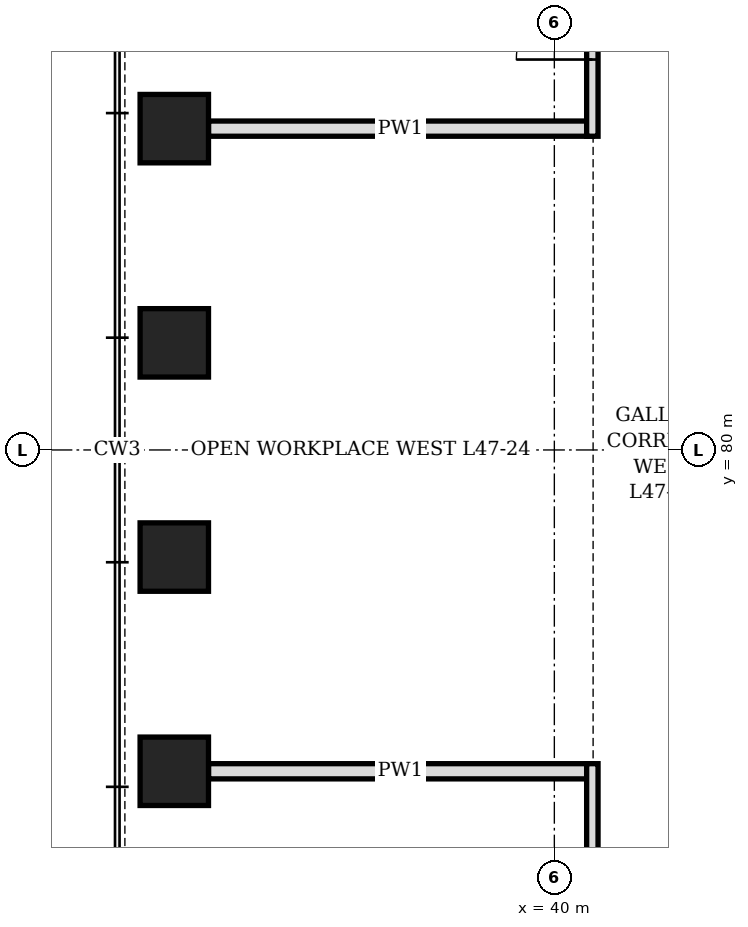
"""IFC4 building model, lengths in metres.
Left out: names, types, materials, properties, quantities, classifications, styles, units other than length and angle.
Written with IfcOpenShell. Run it as: python <this file> out.ifc"""

import sys

from ifc_helpers import new_model, si_unit, direction, frame, frame_2d, origin, origin_2d, place, context, subcontext, project, spatial, rectangle, hollow_rectangle, extrude, element, fill, save


model = new_model("IFC4")
c1 = context("Model", 3, precision=1e-05, world=origin(), true_north=direction((0.0, 1.0)))
c2 = subcontext(c1, "Body", "Model", "MODEL_VIEW")
j1 = project(units=[si_unit("LENGTHUNIT", "METRE"), si_unit("PLANEANGLEUNIT", "RADIAN")], contexts=[c1])
p1 = place(None, origin())
s1 = spatial("IfcSite", under=j1, at=p1, CompositionType="ELEMENT")
p2 = place(p1, origin())
s2 = spatial("IfcBuilding", under=s1, at=p2, CompositionType="ELEMENT")
p3 = place(p2, frame((0.0, 0.0, 210.7)))
s3 = spatial("IfcBuildingStorey", under=s2, at=p3, CompositionType="ELEMENT", Elevation=210.7)
for number, where, z_axis, x_axis in (
    (1, (35.0, 84.227, 0.0), (0.0, 0.0, 1.0), (0.0, 1.0, 0.0)),
    (2, (35.0, 81.409, 0.0), (0.0, 0.0, 1.0), (0.0, 1.0, 0.0)),
    (3, (35.0, 78.591, 0.0), (0.0, 0.0, 1.0), (0.0, 1.0, 0.0)),
    (4, (35.0, 75.773, 0.0), (0.0, 0.0, 1.0), (0.0, 1.0, 0.0)),
):
    element("IfcColumn", number, at=place(p3, frame(where, z_axis=z_axis, x_axis=x_axis)), inside=s3, PredefinedType="COLUMN", context=c2, shape_type="SweptSolid", body=[
        extrude(hollow_rectangle(XDim=0.9, YDim=0.9, WallThickness=0.12, at=origin_2d()), origin(), (0.0, 0.0, 1.0), 4.2),
    ])
for number, where, z_axis, x_axis in (
    (5, (35.45, 75.773, 0.0), (0.0, 0.0, 1.0), (1.0, 0.0, 0.0)),
    (6, (35.45, 84.227, 0.0), (0.0, 0.0, 1.0), (1.0, 0.0, 0.0)),
):
    element("IfcWall", number, at=place(p3, frame(where, z_axis=z_axis, x_axis=x_axis)), inside=s3, PredefinedType="PARTITIONING", context=c2, shape_type="SweptSolid", body=[
        extrude(rectangle(XDim=5.05, YDim=0.2, at=frame_2d((2.525, 0.0))), origin(), (0.0, 0.0, 1.0), 3.428),
    ])
p4 = place(p3, frame((40.5, 64.95, 0.0), z_axis=(0.0, 0.0, 1.0), x_axis=(0.0, 1.0, 0.0)))
e7 = element("IfcWall", 7, at=p4, inside=s3, PredefinedType="PARTITIONING", context=c2, shape_type="SweptSolid", body=[
    extrude(rectangle(XDim=10.923, YDim=0.15, at=frame_2d((5.461, 0.0))), origin(), (0.0, 0.0, 1.0), 4.04),
])
p5 = place(p4, frame((3.277, 0.0, 0.0)))
e8 = element("IfcOpeningElement", 8, at=p5, cuts=e7, PredefinedType="OPENING", context=c2, shape_type="SweptSolid", body=[
    extrude(rectangle(XDim=1.0, YDim=2.4, at=frame_2d((0.5, 1.2))), frame((0.0, 0.085, 0.0), z_axis=(0.0, -1.0, 0.0), x_axis=(1.0, 0.0, 0.0)), (0.0, 0.0, 1.0), 0.17),
])
p6 = place(p3, frame((40.5, 84.127, 0.0), z_axis=(0.0, 0.0, 1.0), x_axis=(0.0, 1.0, 0.0)))
e9 = element("IfcWall", 9, at=p6, inside=s3, PredefinedType="PARTITIONING", context=c2, shape_type="SweptSolid", body=[
    extrude(rectangle(XDim=5.736, YDim=0.15, at=frame_2d((2.868, 0.0))), origin(), (0.0, 0.0, 1.0), 4.04),
])
p7 = place(p6, frame((1.009, 0.0, 0.0)))
e10 = element("IfcOpeningElement", 10, at=p7, cuts=e9, PredefinedType="OPENING", context=c2, shape_type="SweptSolid", body=[
    extrude(rectangle(XDim=1.0, YDim=2.4, at=frame_2d((0.5, 1.2))), frame((0.0, 0.085, 0.0), z_axis=(0.0, -1.0, 0.0), x_axis=(1.0, 0.0, 0.0)), (0.0, 0.0, 1.0), 0.17),
])
p8 = place(p7, origin())
e11 = element("IfcDoor", 11, at=p8, inside=s3, OperationType="SINGLE_SWING_RIGHT", PredefinedType="DOOR", context=c2, shape_type="SweptSolid", body=[
    extrude(rectangle(XDim=1.0, YDim=2.4, at=frame_2d((0.5, 1.2))), frame((0.0, 0.075, 0.0), z_axis=(0.0, -1.0, 0.0), x_axis=(1.0, 0.0, 0.0)), (0.0, 0.0, 1.0), 0.149),
])
fill(e10, e11)
save(model, sys.argv[1])
